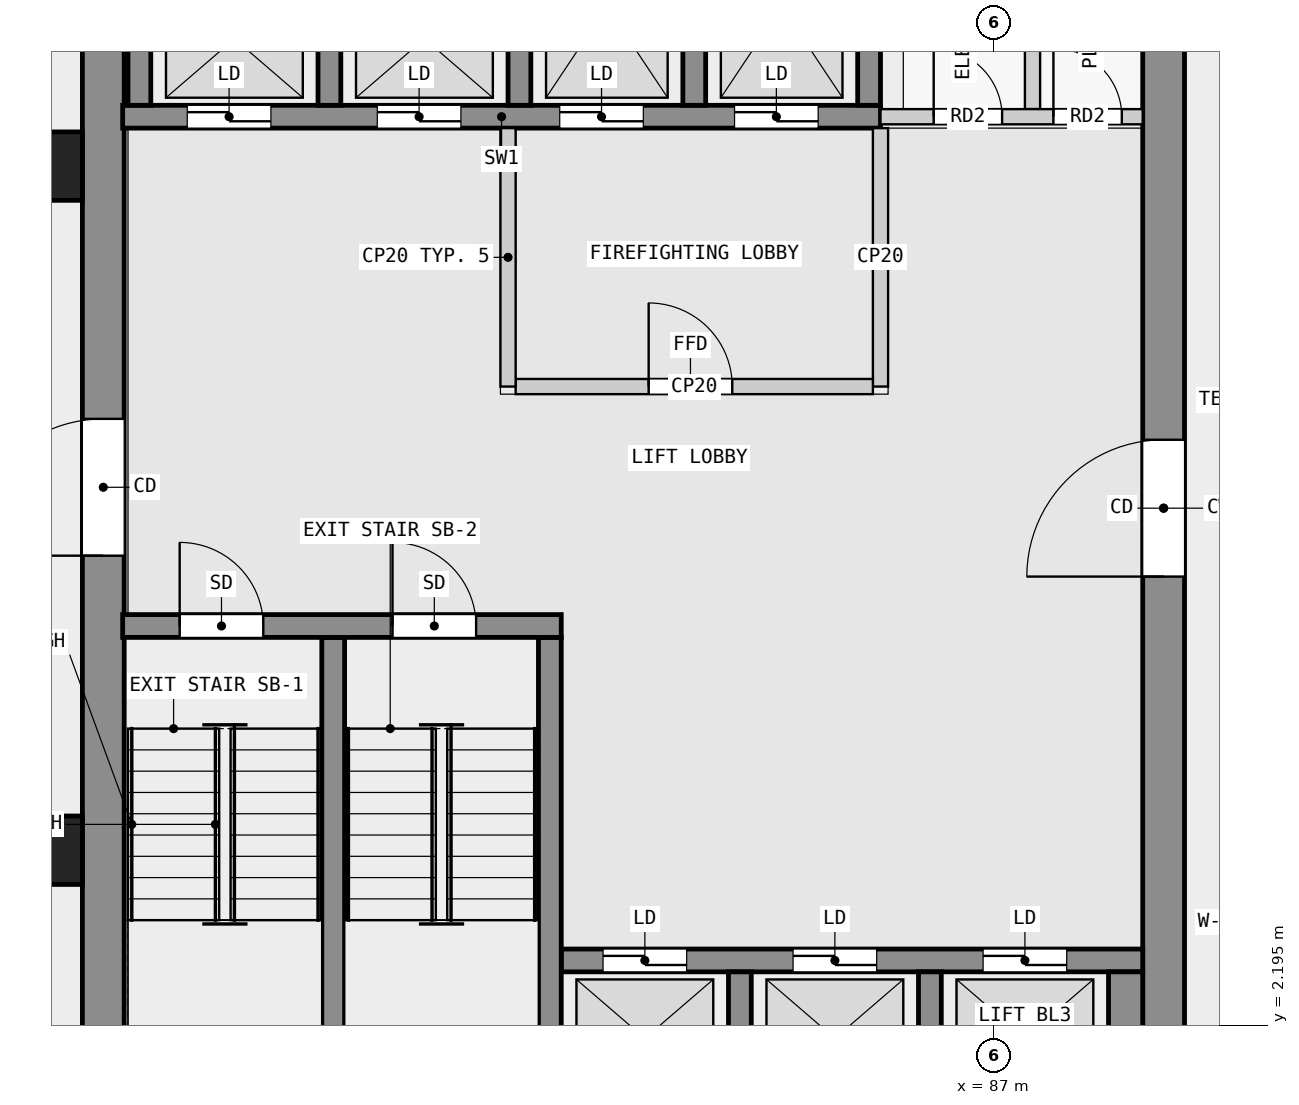
"""IFC4 building model, lengths in metres.
Left out: names, types, materials, properties, quantities, classifications, styles, units other than length and angle.
Written with IfcOpenShell. Run it as: python <this file> out.ifc"""

import sys

from ifc_helpers import new_model, si_unit, direction, frame, frame_2d, origin, origin_2d, place, context, subcontext, project, spatial, rectangle, extrude, element, fill, save


model = new_model("IFC4")
c1 = context("Model", 3, precision=1e-05, world=origin(), true_north=direction((0.0, 1.0)))
c2 = subcontext(c1, "Body", "Model", "MODEL_VIEW")
j1 = project(units=[si_unit("LENGTHUNIT", "METRE"), si_unit("PLANEANGLEUNIT", "RADIAN")], contexts=[c1])
p1 = place(None, origin())
s1 = spatial("IfcSite", under=j1, at=p1, CompositionType="ELEMENT")
p2 = place(p1, origin())
s2 = spatial("IfcBuilding", under=s1, at=p2, CompositionType="ELEMENT")
p3 = place(p2, frame((0.0, 0.0, 33.8)))
s3 = spatial("IfcBuildingStorey", under=s2, at=p3, CompositionType="ELEMENT", Elevation=33.8)
for number, where, z_axis, x_axis in (
    (1, (74.55, 13.5, 0.0), (0.0, 0.0, 1.0), (1.0, 0.0, 0.0)),
    (2, (74.55, 4.5, 0.0), (0.0, 0.0, 1.0), (1.0, 0.0, 0.0)),
):
    element("IfcColumn", number, at=place(p3, frame(where, z_axis=z_axis, x_axis=x_axis)), inside=s3, PredefinedType="COLUMN", context=c2, shape_type="SweptSolid", body=[
        extrude(rectangle(XDim=0.9, YDim=0.9, at=origin_2d()), origin(), (0.0, 0.0, 1.0), 3.5),
    ])
p4 = place(p3, frame((75.275, 0.55, 0.0), z_axis=(0.0, 0.0, 1.0), x_axis=(0.0, 1.0, 0.0)))
e3 = element("IfcWall", 3, at=p4, inside=s3, PredefinedType="SHEAR", context=c2, shape_type="SweptSolid", body=[
    extrude(rectangle(XDim=16.9, YDim=0.55, at=frame_2d((8.45, 0.0))), origin(), (0.0, 0.0, 1.0), 3.25),
])
p5 = place(p4, frame((7.825, 0.0, 0.0)))
e4 = element("IfcOpeningElement", 4, at=p5, cuts=e3, PredefinedType="OPENING", context=c2, shape_type="SweptSolid", body=[
    extrude(rectangle(XDim=1.8, YDim=2.1, at=frame_2d((0.9, 1.05))), frame((0.0, 0.285, 0.0), z_axis=(0.0, -1.0, 0.0), x_axis=(1.0, 0.0, 0.0)), (0.0, 0.0, 1.0), 0.57),
])
p6 = place(p3, frame((89.225, 0.55, 0.0), z_axis=(0.0, 0.0, 1.0), x_axis=(0.0, 1.0, 0.0)))
e5 = element("IfcWall", 5, at=p6, inside=s3, PredefinedType="SHEAR", context=c2, shape_type="SweptSolid", body=[
    extrude(rectangle(XDim=16.9, YDim=0.55, at=frame_2d((8.45, 0.0))), origin(), (0.0, 0.0, 1.0), 3.25),
])
p7 = place(p6, frame((7.55, 0.0, 0.0)))
e6 = element("IfcOpeningElement", 6, at=p7, cuts=e5, PredefinedType="OPENING", context=c2, shape_type="SweptSolid", body=[
    extrude(rectangle(XDim=1.8, YDim=2.1, at=frame_2d((0.9, 1.05))), frame((0.0, 0.285, 0.0), z_axis=(0.0, -1.0, 0.0), x_axis=(1.0, 0.0, 0.0)), (0.0, 0.0, 1.0), 0.57),
])
p8 = place(p3, frame((75.53, 7.45, 0.0), z_axis=(0.0, 0.0, 1.0), x_axis=(1.0, 0.0, 0.0)))
e7 = element("IfcWall", 7, at=p8, inside=s3, PredefinedType="SHEAR", context=c2, shape_type="SweptSolid", body=[
    extrude(rectangle(XDim=5.77, YDim=0.3, at=frame_2d((2.885, 0.0))), origin(), (0.0, 0.0, 1.0), 3.25),
])
p9 = place(p8, frame((0.75, 0.0, 0.0)))
e8 = element("IfcOpeningElement", 8, at=p9, cuts=e7, PredefinedType="OPENING", context=c2, shape_type="SweptSolid", body=[
    extrude(rectangle(XDim=1.1, YDim=2.1, at=frame_2d((0.55, 1.05))), frame((0.0, 0.16, 0.0), z_axis=(0.0, -1.0, 0.0), x_axis=(1.0, 0.0, 0.0)), (0.0, 0.0, 1.0), 0.32),
])
p10 = place(p8, frame((3.55, 0.0, 0.0)))
e9 = element("IfcOpeningElement", 9, at=p10, cuts=e7, PredefinedType="OPENING", context=c2, shape_type="SweptSolid", body=[
    extrude(rectangle(XDim=1.1, YDim=2.1, at=frame_2d((0.55, 1.05))), frame((0.0, 0.16, 0.0), z_axis=(0.0, -1.0, 0.0), x_axis=(1.0, 0.0, 0.0)), (0.0, 0.0, 1.0), 0.32),
])
for number, where, z_axis, x_axis in (
    (10, (78.3, 0.9, 0.0), (0.0, 0.0, 1.0), (0.0, 1.0, 0.0)),
    (11, (81.15, 0.9, 0.0), (0.0, 0.0, 1.0), (0.0, 1.0, 0.0)),
):
    element("IfcWall", number, at=place(p3, frame(where, z_axis=z_axis, x_axis=x_axis)), inside=s3, PredefinedType="SHEAR", context=c2, shape_type="SweptSolid", body=[
        extrude(rectangle(XDim=6.4, YDim=0.3, at=frame_2d((3.2, 0.0))), origin(), (0.0, 0.0, 1.0), 3.25),
    ])
for number, where, z_axis, x_axis in (
    (12, (83.65, 0.9, 0.0), (0.0, 0.0, 1.0), (0.0, 1.0, 0.0)),
    (13, (86.15, 0.9, 0.0), (0.0, 0.0, 1.0), (0.0, 1.0, 0.0)),
):
    element("IfcWall", number, at=place(p3, frame(where, z_axis=z_axis, x_axis=x_axis)), inside=s3, PredefinedType="SHEAR", context=c2, shape_type="SweptSolid", body=[
        extrude(rectangle(XDim=2.0, YDim=0.3, at=frame_2d((1.0, 0.0))), origin(), (0.0, 0.0, 1.0), 3.25),
    ])
p11 = place(p3, frame((88.725, 0.9, 0.0), z_axis=(0.0, 0.0, 1.0), x_axis=(0.0, 1.0, 0.0)))
e14 = element("IfcWall", 14, at=p11, inside=s3, PredefinedType="SHEAR", context=c2, shape_type="SweptSolid", body=[
    extrude(rectangle(XDim=2.0, YDim=0.45, at=frame_2d((1.0, 0.0))), origin(), (0.0, 0.0, 1.0), 3.25),
])
p12 = place(p3, frame((81.3, 3.05, 0.0), z_axis=(0.0, 0.0, 1.0), x_axis=(1.0, 0.0, 0.0)))
e15 = element("IfcWall", 15, at=p12, inside=s3, PredefinedType="SHEAR", context=c2, shape_type="SweptSolid", body=[
    extrude(rectangle(XDim=7.65, YDim=0.3, at=frame_2d((3.825, 0.0))), origin(), (0.0, 0.0, 1.0), 3.25),
])
p13 = place(p12, frame((0.55, 0.0, 0.0)))
e16 = element("IfcOpeningElement", 16, at=p13, cuts=e15, PredefinedType="OPENING", context=c2, shape_type="SweptSolid", body=[
    extrude(rectangle(XDim=1.1, YDim=2.1, at=frame_2d((0.55, 1.05))), frame((0.0, 0.16, 0.0), z_axis=(0.0, -1.0, 0.0), x_axis=(1.0, 0.0, 0.0)), (0.0, 0.0, 1.0), 0.32),
])
p14 = place(p12, frame((3.05, 0.0, 0.0)))
e17 = element("IfcOpeningElement", 17, at=p14, cuts=e15, PredefinedType="OPENING", context=c2, shape_type="SweptSolid", body=[
    extrude(rectangle(XDim=1.1, YDim=2.1, at=frame_2d((0.55, 1.05))), frame((0.0, 0.16, 0.0), z_axis=(0.0, -1.0, 0.0), x_axis=(1.0, 0.0, 0.0)), (0.0, 0.0, 1.0), 0.32),
])
p15 = place(p12, frame((5.55, 0.0, 0.0)))
e18 = element("IfcOpeningElement", 18, at=p15, cuts=e15, PredefinedType="OPENING", context=c2, shape_type="SweptSolid", body=[
    extrude(rectangle(XDim=1.1, YDim=2.1, at=frame_2d((0.55, 1.05))), frame((0.0, 0.16, 0.0), z_axis=(0.0, -1.0, 0.0), x_axis=(1.0, 0.0, 0.0)), (0.0, 0.0, 1.0), 0.32),
])
p16 = place(p3, frame((75.53, 14.15, 0.0), z_axis=(0.0, 0.0, 1.0), x_axis=(1.0, 0.0, 0.0)))
e19 = element("IfcWall", 19, at=p16, inside=s3, PredefinedType="SHEAR", context=c2, shape_type="SweptSolid", body=[
    extrude(rectangle(XDim=9.97, YDim=0.3, at=frame_2d((4.985, 0.0))), origin(), (0.0, 0.0, 1.0), 3.25),
])
p17 = place(p16, frame((0.85, 0.0, 0.0)))
e20 = element("IfcOpeningElement", 20, at=p17, cuts=e19, PredefinedType="OPENING", context=c2, shape_type="SweptSolid", body=[
    extrude(rectangle(XDim=1.1, YDim=2.1, at=frame_2d((0.55, 1.05))), frame((0.0, 0.16, 0.0), z_axis=(0.0, -1.0, 0.0), x_axis=(1.0, 0.0, 0.0)), (0.0, 0.0, 1.0), 0.32),
])
p18 = place(p16, frame((3.35, 0.0, 0.0)))
e21 = element("IfcOpeningElement", 21, at=p18, cuts=e19, PredefinedType="OPENING", context=c2, shape_type="SweptSolid", body=[
    extrude(rectangle(XDim=1.1, YDim=2.1, at=frame_2d((0.55, 1.05))), frame((0.0, 0.16, 0.0), z_axis=(0.0, -1.0, 0.0), x_axis=(1.0, 0.0, 0.0)), (0.0, 0.0, 1.0), 0.32),
])
p19 = place(p16, frame((5.75, 0.0, 0.0)))
e22 = element("IfcOpeningElement", 22, at=p19, cuts=e19, PredefinedType="OPENING", context=c2, shape_type="SweptSolid", body=[
    extrude(rectangle(XDim=1.1, YDim=2.1, at=frame_2d((0.55, 1.05))), frame((0.0, 0.16, 0.0), z_axis=(0.0, -1.0, 0.0), x_axis=(1.0, 0.0, 0.0)), (0.0, 0.0, 1.0), 0.32),
])
p20 = place(p16, frame((8.05, 0.0, 0.0)))
e23 = element("IfcOpeningElement", 23, at=p20, cuts=e19, PredefinedType="OPENING", context=c2, shape_type="SweptSolid", body=[
    extrude(rectangle(XDim=1.1, YDim=2.1, at=frame_2d((0.55, 1.05))), frame((0.0, 0.16, 0.0), z_axis=(0.0, -1.0, 0.0), x_axis=(1.0, 0.0, 0.0)), (0.0, 0.0, 1.0), 0.32),
])
for number, where, z_axis, x_axis in (
    (24, (75.75, 14.3, 0.0), (0.0, 0.0, 1.0), (0.0, 1.0, 0.0)),
    (25, (78.25, 14.3, 0.0), (0.0, 0.0, 1.0), (0.0, 1.0, 0.0)),
    (26, (80.75, 14.3, 0.0), (0.0, 0.0, 1.0), (0.0, 1.0, 0.0)),
    (27, (83.05, 14.3, 0.0), (0.0, 0.0, 1.0), (0.0, 1.0, 0.0)),
    (28, (85.35, 14.3, 0.0), (0.0, 0.0, 1.0), (0.0, 1.0, 0.0)),
):
    element("IfcWall", number, at=place(p3, frame(where, z_axis=z_axis, x_axis=x_axis)), inside=s3, PredefinedType="SHEAR", context=c2, shape_type="SweptSolid", body=[
        extrude(rectangle(XDim=2.8, YDim=0.3, at=frame_2d((1.4, 0.0))), origin(), (0.0, 0.0, 1.0), 3.25),
    ])
p21 = place(p3, frame((80.6, 10.6, 0.0), z_axis=(0.0, 0.0, 1.0), x_axis=(0.0, 1.0, 0.0)))
e29 = element("IfcWall", 29, at=p21, inside=s3, PredefinedType="PARTITIONING", context=c2, shape_type="SweptSolid", body=[
    extrude(rectangle(XDim=3.4, YDim=0.2, at=frame_2d((1.7, 0.0))), origin(), (0.0, 0.0, 1.0), 3.25),
])
p22 = place(p3, frame((80.7, 10.6, 0.0), z_axis=(0.0, 0.0, 1.0), x_axis=(1.0, 0.0, 0.0)))
e30 = element("IfcWall", 30, at=p22, inside=s3, PredefinedType="PARTITIONING", context=c2, shape_type="SweptSolid", body=[
    extrude(rectangle(XDim=4.7, YDim=0.2, at=frame_2d((2.35, 0.0))), origin(), (0.0, 0.0, 1.0), 3.25),
])
p23 = place(p22, frame((1.75, 0.0, 0.0)))
e31 = element("IfcOpeningElement", 31, at=p23, cuts=e30, PredefinedType="OPENING", context=c2, shape_type="SweptSolid", body=[
    extrude(rectangle(XDim=1.1, YDim=2.1, at=frame_2d((0.55, 1.05))), frame((0.0, 0.11, 0.0), z_axis=(0.0, -1.0, 0.0), x_axis=(1.0, 0.0, 0.0)), (0.0, 0.0, 1.0), 0.22),
])
p24 = place(p3, frame((85.5, 10.6, 0.0), z_axis=(0.0, 0.0, 1.0), x_axis=(0.0, 1.0, 0.0)))
e32 = element("IfcWall", 32, at=p24, inside=s3, PredefinedType="PARTITIONING", context=c2, shape_type="SweptSolid", body=[
    extrude(rectangle(XDim=3.4, YDim=0.2, at=frame_2d((1.7, 0.0))), origin(), (0.0, 0.0, 1.0), 3.25),
])
p25 = place(p3, frame((85.5, 14.15, 0.0), z_axis=(0.0, 0.0, 1.0), x_axis=(1.0, 0.0, 0.0)))
e33 = element("IfcWall", 33, at=p25, inside=s3, PredefinedType="PARTITIONING", context=c2, shape_type="SweptSolid", body=[
    extrude(rectangle(XDim=3.45, YDim=0.2, at=frame_2d((1.725, 0.0))), origin(), (0.0, 0.0, 1.0), 3.25),
])
p26 = place(p25, frame((0.7, 0.0, 0.0)))
e34 = element("IfcOpeningElement", 34, at=p26, cuts=e33, PredefinedType="OPENING", context=c2, shape_type="SweptSolid", body=[
    extrude(rectangle(XDim=0.9, YDim=2.1, at=frame_2d((0.45, 1.05))), frame((0.0, 0.11, 0.0), z_axis=(0.0, -1.0, 0.0), x_axis=(1.0, 0.0, 0.0)), (0.0, 0.0, 1.0), 0.22),
])
p27 = place(p25, frame((2.275, 0.0, 0.0)))
e35 = element("IfcOpeningElement", 35, at=p27, cuts=e33, PredefinedType="OPENING", context=c2, shape_type="SweptSolid", body=[
    extrude(rectangle(XDim=0.9, YDim=2.1, at=frame_2d((0.45, 1.05))), frame((0.0, 0.11, 0.0), z_axis=(0.0, -1.0, 0.0), x_axis=(1.0, 0.0, 0.0)), (0.0, 0.0, 1.0), 0.22),
])
p28 = place(p3, frame((87.5, 14.25, 0.0), z_axis=(0.0, 0.0, 1.0), x_axis=(0.0, 1.0, 0.0)))
e36 = element("IfcWall", 36, at=p28, inside=s3, PredefinedType="PARTITIONING", context=c2, shape_type="SweptSolid", body=[
    extrude(rectangle(XDim=3.2, YDim=0.2, at=frame_2d((1.6, 0.0))), origin(), (0.0, 0.0, 1.0), 3.25),
])
p29 = place(p23, origin())
e37 = element("IfcDoor", 37, at=p29, inside=s3, OperationType="SINGLE_SWING_LEFT", PredefinedType="DOOR", context=c2, shape_type="SweptSolid", body=[
    extrude(rectangle(XDim=1.1, YDim=2.1, at=frame_2d((0.55, 1.05))), frame((0.0, 0.025, 0.0), z_axis=(0.0, -1.0, 0.0), x_axis=(1.0, 0.0, 0.0)), (0.0, 0.0, 1.0), 0.05),
])
fill(e31, e37)
p30 = place(p13, origin())
e38 = element("IfcDoor", 38, at=p30, inside=s3, OperationType="DOUBLE_DOOR_SLIDING", PredefinedType="DOOR", context=c2, shape_type="SweptSolid", body=[
    extrude(rectangle(XDim=1.1, YDim=2.1, at=frame_2d((0.55, 1.05))), frame((0.0, 0.025, 0.0), z_axis=(0.0, -1.0, 0.0), x_axis=(1.0, 0.0, 0.0)), (0.0, 0.0, 1.0), 0.05),
])
fill(e16, e38)
p31 = place(p14, origin())
e39 = element("IfcDoor", 39, at=p31, inside=s3, OperationType="DOUBLE_DOOR_SLIDING", PredefinedType="DOOR", context=c2, shape_type="SweptSolid", body=[
    extrude(rectangle(XDim=1.1, YDim=2.1, at=frame_2d((0.55, 1.05))), frame((0.0, 0.025, 0.0), z_axis=(0.0, -1.0, 0.0), x_axis=(1.0, 0.0, 0.0)), (0.0, 0.0, 1.0), 0.05),
])
fill(e17, e39)
p32 = place(p15, origin())
e40 = element("IfcDoor", 40, at=p32, inside=s3, OperationType="DOUBLE_DOOR_SLIDING", PredefinedType="DOOR", context=c2, shape_type="SweptSolid", body=[
    extrude(rectangle(XDim=1.1, YDim=2.1, at=frame_2d((0.55, 1.05))), frame((0.0, 0.025, 0.0), z_axis=(0.0, -1.0, 0.0), x_axis=(1.0, 0.0, 0.0)), (0.0, 0.0, 1.0), 0.05),
])
fill(e18, e40)
p33 = place(p17, origin())
e41 = element("IfcDoor", 41, at=p33, inside=s3, OperationType="DOUBLE_DOOR_SLIDING", PredefinedType="DOOR", context=c2, shape_type="SweptSolid", body=[
    extrude(rectangle(XDim=1.1, YDim=2.1, at=frame_2d((0.55, 1.05))), frame((0.0, 0.025, 0.0), z_axis=(0.0, -1.0, 0.0), x_axis=(1.0, 0.0, 0.0)), (0.0, 0.0, 1.0), 0.05),
])
fill(e20, e41)
p34 = place(p18, origin())
e42 = element("IfcDoor", 42, at=p34, inside=s3, OperationType="DOUBLE_DOOR_SLIDING", PredefinedType="DOOR", context=c2, shape_type="SweptSolid", body=[
    extrude(rectangle(XDim=1.1, YDim=2.1, at=frame_2d((0.55, 1.05))), frame((0.0, 0.025, 0.0), z_axis=(0.0, -1.0, 0.0), x_axis=(1.0, 0.0, 0.0)), (0.0, 0.0, 1.0), 0.05),
])
fill(e21, e42)
p35 = place(p19, origin())
e43 = element("IfcDoor", 43, at=p35, inside=s3, OperationType="DOUBLE_DOOR_SLIDING", PredefinedType="DOOR", context=c2, shape_type="SweptSolid", body=[
    extrude(rectangle(XDim=1.1, YDim=2.1, at=frame_2d((0.55, 1.05))), frame((0.0, 0.025, 0.0), z_axis=(0.0, -1.0, 0.0), x_axis=(1.0, 0.0, 0.0)), (0.0, 0.0, 1.0), 0.05),
])
fill(e22, e43)
p36 = place(p20, origin())
e44 = element("IfcDoor", 44, at=p36, inside=s3, OperationType="DOUBLE_DOOR_SLIDING", PredefinedType="DOOR", context=c2, shape_type="SweptSolid", body=[
    extrude(rectangle(XDim=1.1, YDim=2.1, at=frame_2d((0.55, 1.05))), frame((0.0, 0.025, 0.0), z_axis=(0.0, -1.0, 0.0), x_axis=(1.0, 0.0, 0.0)), (0.0, 0.0, 1.0), 0.05),
])
fill(e23, e44)
p37 = place(p9, origin())
e45 = element("IfcDoor", 45, at=p37, inside=s3, OperationType="SINGLE_SWING_RIGHT", PredefinedType="DOOR", context=c2, shape_type="SweptSolid", body=[
    extrude(rectangle(XDim=1.1, YDim=2.1, at=frame_2d((0.55, 1.05))), frame((0.0, 0.025, 0.0), z_axis=(0.0, -1.0, 0.0), x_axis=(1.0, 0.0, 0.0)), (0.0, 0.0, 1.0), 0.05),
])
fill(e8, e45)
p38 = place(p10, origin())
e46 = element("IfcDoor", 46, at=p38, inside=s3, OperationType="SINGLE_SWING_LEFT", PredefinedType="DOOR", context=c2, shape_type="SweptSolid", body=[
    extrude(rectangle(XDim=1.1, YDim=2.1, at=frame_2d((0.55, 1.05))), frame((0.0, 0.025, 0.0), z_axis=(0.0, -1.0, 0.0), x_axis=(1.0, 0.0, 0.0)), (0.0, 0.0, 1.0), 0.05),
])
fill(e9, e46)
p39 = place(p5, origin())
e47 = element("IfcDoor", 47, at=p39, inside=s3, OperationType="DOUBLE_DOOR_SINGLE_SWING", PredefinedType="DOOR", context=c2, shape_type="SweptSolid", body=[
    extrude(rectangle(XDim=1.8, YDim=2.1, at=frame_2d((0.9, 1.05))), frame((0.0, 0.025, 0.0), z_axis=(0.0, -1.0, 0.0), x_axis=(1.0, 0.0, 0.0)), (0.0, 0.0, 1.0), 0.05),
])
fill(e4, e47)
p40 = place(p7, origin())
e48 = element("IfcDoor", 48, at=p40, inside=s3, OperationType="DOUBLE_DOOR_SINGLE_SWING", PredefinedType="DOOR", context=c2, shape_type="SweptSolid", body=[
    extrude(rectangle(XDim=1.8, YDim=2.1, at=frame_2d((0.9, 1.05))), frame((0.0, 0.025, 0.0), z_axis=(0.0, -1.0, 0.0), x_axis=(1.0, 0.0, 0.0)), (0.0, 0.0, 1.0), 0.05),
])
fill(e6, e48)
p41 = place(p26, origin())
e49 = element("IfcDoor", 49, at=p41, inside=s3, OperationType="SINGLE_SWING_LEFT", PredefinedType="DOOR", context=c2, shape_type="SweptSolid", body=[
    extrude(rectangle(XDim=0.9, YDim=2.1, at=frame_2d((0.45, 1.05))), frame((0.0, 0.025, 0.0), z_axis=(0.0, -1.0, 0.0), x_axis=(1.0, 0.0, 0.0)), (0.0, 0.0, 1.0), 0.05),
])
fill(e34, e49)
p42 = place(p27, origin())
e50 = element("IfcDoor", 50, at=p42, inside=s3, OperationType="SINGLE_SWING_LEFT", PredefinedType="DOOR", context=c2, shape_type="SweptSolid", body=[
    extrude(rectangle(XDim=0.9, YDim=2.1, at=frame_2d((0.45, 1.05))), frame((0.0, 0.025, 0.0), z_axis=(0.0, -1.0, 0.0), x_axis=(1.0, 0.0, 0.0)), (0.0, 0.0, 1.0), 0.05),
])
fill(e35, e50)
save(model, sys.argv[1])
